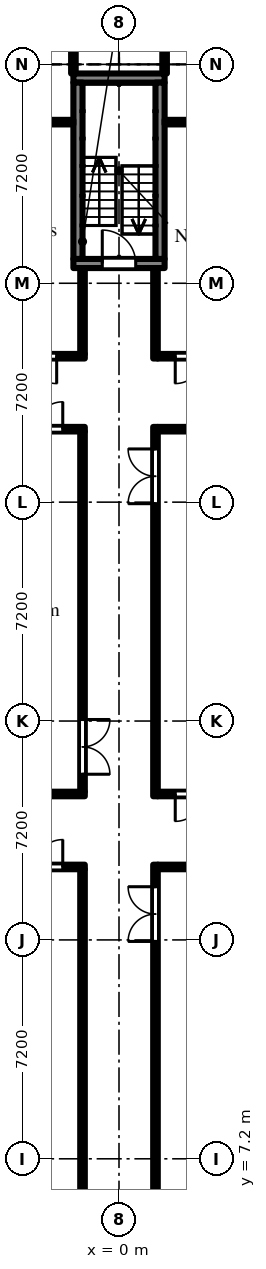
"""IFC4 building model, lengths in metres.
Left out: names, types, materials, properties, quantities, classifications, styles, units other than length and angle.
Written with IfcOpenShell. Run it as: python <this file> out.ifc"""

import sys

from ifc_helpers import new_model, si_unit, direction, frame, frame_2d, origin, place, context, subcontext, project, spatial, rectangle, extrude, element, fill, save


model = new_model("IFC4")
c1 = context("Model", 3, precision=1e-05, world=origin(), true_north=direction((0.0, 1.0)))
c2 = subcontext(c1, "Body", "Model", "MODEL_VIEW")
j1 = project(units=[si_unit("LENGTHUNIT", "METRE"), si_unit("PLANEANGLEUNIT", "RADIAN")], contexts=[c1])
p1 = place(None, origin())
s1 = spatial("IfcSite", under=j1, at=p1, CompositionType="ELEMENT")
p2 = place(p1, origin())
s2 = spatial("IfcBuilding", under=s1, at=p2, CompositionType="ELEMENT")
p3 = place(p2, frame((0.0, 0.0, -4.8)))
s3 = spatial("IfcBuildingStorey", under=s2, at=p3, CompositionType="ELEMENT", Elevation=-4.8)
p4 = place(p3, frame((-1.5, 36.65, 0.0), z_axis=(0.0, 0.0, 1.0), x_axis=(1.0, 0.0, 0.0)))
e1 = element("IfcWall", 1, at=p4, inside=s3, PredefinedType="SHEAR", context=c2, shape_type="SweptSolid", body=[
    extrude(rectangle(XDim=3.0, YDim=0.3, at=frame_2d((1.5, 0.0))), origin(), (0.0, 0.0, 1.0), 4.35),
])
p5 = place(p4, frame((0.95, 0.0, 0.0)))
e2 = element("IfcOpeningElement", 2, at=p5, cuts=e1, PredefinedType="OPENING", context=c2, shape_type="SweptSolid", body=[
    extrude(rectangle(XDim=1.1, YDim=2.1, at=frame_2d((0.55, 1.05))), frame((0.0, 0.16, 0.0), z_axis=(0.0, -1.0, 0.0), x_axis=(1.0, 0.0, 0.0)), (0.0, 0.0, 1.0), 0.32),
])
p6 = place(p3, frame((-1.5, 42.75, 0.0), z_axis=(0.0, 0.0, 1.0), x_axis=(1.0, 0.0, 0.0)))
e3 = element("IfcWall", 3, at=p6, inside=s3, PredefinedType="SHEAR", context=c2, shape_type="SweptSolid", body=[
    extrude(rectangle(XDim=3.0, YDim=0.3, at=frame_2d((1.5, 0.0))), origin(), (0.0, 0.0, 1.0), 4.35),
])
for number, where, z_axis, x_axis in (
    (4, (-1.35, 36.8, 0.0), (0.0, 0.0, 1.0), (0.0, 1.0, 0.0)),
    (5, (1.35, 36.8, 0.0), (0.0, 0.0, 1.0), (0.0, 1.0, 0.0)),
):
    element("IfcWall", number, at=place(p3, frame(where, z_axis=z_axis, x_axis=x_axis)), inside=s3, PredefinedType="SHEAR", context=c2, shape_type="SweptSolid", body=[
        extrude(rectangle(XDim=5.8, YDim=0.3, at=frame_2d((2.9, 0.0))), origin(), (0.0, 0.0, 1.0), 4.35),
    ])
p7 = place(p3, frame((-16.125, 16.8, 0.0), z_axis=(0.0, 0.0, 1.0), x_axis=(1.0, 0.0, 0.0)))
e6 = element("IfcWall", 6, at=p7, inside=s3, PredefinedType="PARTITIONING", context=c2, shape_type="SweptSolid", body=[
    extrude(rectangle(XDim=15.0, YDim=0.15, at=frame_2d((7.5, 0.0))), origin(), (0.0, 0.0, 1.0), 4.35),
])
p8 = place(p7, frame((12.475, 0.0, 0.0)))
e7 = element("IfcOpeningElement", 7, at=p8, cuts=e6, PredefinedType="OPENING", context=c2, shape_type="SweptSolid", body=[
    extrude(rectangle(XDim=1.8, YDim=2.1, at=frame_2d((0.9, 1.05))), frame((0.0, 0.085, 0.0), z_axis=(0.0, -1.0, 0.0), x_axis=(1.0, 0.0, 0.0)), (0.0, 0.0, 1.0), 0.17),
])
p9 = place(p3, frame((-16.125, 19.2, 0.0), z_axis=(0.0, 0.0, 1.0), x_axis=(1.0, 0.0, 0.0)))
e8 = element("IfcWall", 8, at=p9, inside=s3, PredefinedType="PARTITIONING", context=c2, shape_type="SweptSolid", body=[
    extrude(rectangle(XDim=15.0, YDim=0.15, at=frame_2d((7.5, 0.0))), origin(), (0.0, 0.0, 1.0), 4.35),
])
p10 = place(p9, frame((0.575, 0.0, 0.0)))
e9 = element("IfcOpeningElement", 9, at=p10, cuts=e8, PredefinedType="OPENING", context=c2, shape_type="SweptSolid", body=[
    extrude(rectangle(XDim=1.8, YDim=2.1, at=frame_2d((0.9, 1.05))), frame((0.0, 0.085, 0.0), z_axis=(0.0, -1.0, 0.0), x_axis=(1.0, 0.0, 0.0)), (0.0, 0.0, 1.0), 0.17),
])
p11 = place(p3, frame((-16.125, 31.2, 0.0), z_axis=(0.0, 0.0, 1.0), x_axis=(1.0, 0.0, 0.0)))
e10 = element("IfcWall", 10, at=p11, inside=s3, PredefinedType="PARTITIONING", context=c2, shape_type="SweptSolid", body=[
    extrude(rectangle(XDim=15.0, YDim=0.15, at=frame_2d((7.5, 0.0))), origin(), (0.0, 0.0, 1.0), 4.35),
])
p12 = place(p11, frame((12.475, 0.0, 0.0)))
e11 = element("IfcOpeningElement", 11, at=p12, cuts=e10, PredefinedType="OPENING", context=c2, shape_type="SweptSolid", body=[
    extrude(rectangle(XDim=1.8, YDim=2.1, at=frame_2d((0.9, 1.05))), frame((0.0, 0.085, 0.0), z_axis=(0.0, -1.0, 0.0), x_axis=(1.0, 0.0, 0.0)), (0.0, 0.0, 1.0), 0.17),
])
p13 = place(p3, frame((-16.125, 33.6, 0.0), z_axis=(0.0, 0.0, 1.0), x_axis=(1.0, 0.0, 0.0)))
e12 = element("IfcWall", 12, at=p13, inside=s3, PredefinedType="PARTITIONING", context=c2, shape_type="SweptSolid", body=[
    extrude(rectangle(XDim=15.0, YDim=0.15, at=frame_2d((7.5, 0.0))), origin(), (0.0, 0.0, 1.0), 4.35),
])
p14 = place(p13, frame((12.275, 0.0, 0.0)))
e13 = element("IfcOpeningElement", 13, at=p14, cuts=e12, PredefinedType="OPENING", context=c2, shape_type="SweptSolid", body=[
    extrude(rectangle(XDim=1.8, YDim=2.1, at=frame_2d((0.9, 1.05))), frame((0.0, 0.085, 0.0), z_axis=(0.0, -1.0, 0.0), x_axis=(1.0, 0.0, 0.0)), (0.0, 0.0, 1.0), 0.17),
])
p15 = place(p3, frame((-16.125, 41.3, 0.0), z_axis=(0.0, 0.0, 1.0), x_axis=(1.0, 0.0, 0.0)))
e14 = element("IfcWall", 14, at=p15, inside=s3, PredefinedType="PARTITIONING", context=c2, shape_type="SweptSolid", body=[
    extrude(rectangle(XDim=14.625, YDim=0.15, at=frame_2d((7.312, 0.0))), origin(), (0.0, 0.0, 1.0), 4.35),
])
p16 = place(p15, frame((10.725, 0.0, 0.0)))
e15 = element("IfcOpeningElement", 15, at=p16, cuts=e14, PredefinedType="OPENING", context=c2, shape_type="SweptSolid", body=[
    extrude(rectangle(XDim=1.8, YDim=2.1, at=frame_2d((0.9, 1.05))), frame((0.0, 0.085, 0.0), z_axis=(0.0, -1.0, 0.0), x_axis=(1.0, 0.0, 0.0)), (0.0, 0.0, 1.0), 0.17),
])
p17 = place(p3, frame((-1.5, 42.9, 0.0), z_axis=(0.0, 0.0, 1.0), x_axis=(0.0, 1.0, 0.0)))
e16 = element("IfcWall", 16, at=p17, inside=s3, PredefinedType="PARTITIONING", context=c2, shape_type="SweptSolid", body=[
    extrude(rectangle(XDim=0.825, YDim=0.15, at=frame_2d((0.413, 0.0))), origin(), (0.0, 0.0, 1.0), 4.35),
])
p18 = place(p3, frame((-1.2, 1.275, 0.0), z_axis=(0.0, 0.0, 1.0), x_axis=(0.0, 1.0, 0.0)))
e17 = element("IfcWall", 17, at=p18, inside=s3, PredefinedType="PARTITIONING", context=c2, shape_type="SweptSolid", body=[
    extrude(rectangle(XDim=15.45, YDim=0.15, at=frame_2d((7.725, 0.0))), origin(), (0.0, 0.0, 1.0), 4.35),
])
p19 = place(p3, frame((-1.2, 19.275, 0.0), z_axis=(0.0, 0.0, 1.0), x_axis=(0.0, 1.0, 0.0)))
e18 = element("IfcWall", 18, at=p19, inside=s3, PredefinedType="PARTITIONING", context=c2, shape_type="SweptSolid", body=[
    extrude(rectangle(XDim=11.85, YDim=0.15, at=frame_2d((5.925, 0.0))), origin(), (0.0, 0.0, 1.0), 4.35),
])
p20 = place(p19, frame((0.575, 0.0, 0.0)))
e19 = element("IfcOpeningElement", 19, at=p20, cuts=e18, PredefinedType="OPENING", context=c2, shape_type="SweptSolid", body=[
    extrude(rectangle(XDim=1.8, YDim=2.1, at=frame_2d((0.9, 1.05))), frame((0.0, 0.085, 0.0), z_axis=(0.0, -1.0, 0.0), x_axis=(1.0, 0.0, 0.0)), (0.0, 0.0, 1.0), 0.17),
])
p21 = place(p3, frame((-1.2, 33.675, 0.0), z_axis=(0.0, 0.0, 1.0), x_axis=(0.0, 1.0, 0.0)))
e20 = element("IfcWall", 20, at=p21, inside=s3, PredefinedType="PARTITIONING", context=c2, shape_type="SweptSolid", body=[
    extrude(rectangle(XDim=2.825, YDim=0.15, at=frame_2d((1.413, 0.0))), origin(), (0.0, 0.0, 1.0), 4.35),
])
p22 = place(p3, frame((1.2, 1.125, 0.0), z_axis=(0.0, 0.0, 1.0), x_axis=(0.0, 1.0, 0.0)))
e21 = element("IfcWall", 21, at=p22, inside=s3, PredefinedType="PARTITIONING", context=c2, shape_type="SweptSolid", body=[
    extrude(rectangle(XDim=15.75, YDim=0.15, at=frame_2d((7.875, 0.0))), origin(), (0.0, 0.0, 1.0), 4.35),
])
p23 = place(p22, frame((13.225, 0.0, 0.0)))
e22 = element("IfcOpeningElement", 22, at=p23, cuts=e21, PredefinedType="OPENING", context=c2, shape_type="SweptSolid", body=[
    extrude(rectangle(XDim=1.8, YDim=2.1, at=frame_2d((0.9, 1.05))), frame((0.0, 0.085, 0.0), z_axis=(0.0, -1.0, 0.0), x_axis=(1.0, 0.0, 0.0)), (0.0, 0.0, 1.0), 0.17),
])
p24 = place(p3, frame((1.275, 16.8, 0.0), z_axis=(0.0, 0.0, 1.0), x_axis=(1.0, 0.0, 0.0)))
e23 = element("IfcWall", 23, at=p24, inside=s3, PredefinedType="PARTITIONING", context=c2, shape_type="SweptSolid", body=[
    extrude(rectangle(XDim=15.0, YDim=0.15, at=frame_2d((7.5, 0.0))), origin(), (0.0, 0.0, 1.0), 4.35),
])
p25 = place(p24, frame((12.475, 0.0, 0.0)))
e24 = element("IfcOpeningElement", 24, at=p25, cuts=e23, PredefinedType="OPENING", context=c2, shape_type="SweptSolid", body=[
    extrude(rectangle(XDim=1.8, YDim=2.1, at=frame_2d((0.9, 1.05))), frame((0.0, 0.085, 0.0), z_axis=(0.0, -1.0, 0.0), x_axis=(1.0, 0.0, 0.0)), (0.0, 0.0, 1.0), 0.17),
])
p26 = place(p3, frame((1.2, 19.125, 0.0), z_axis=(0.0, 0.0, 1.0), x_axis=(0.0, 1.0, 0.0)))
e25 = element("IfcWall", 25, at=p26, inside=s3, PredefinedType="PARTITIONING", context=c2, shape_type="SweptSolid", body=[
    extrude(rectangle(XDim=12.15, YDim=0.15, at=frame_2d((6.075, 0.0))), origin(), (0.0, 0.0, 1.0), 4.35),
])
p27 = place(p26, frame((9.625, 0.0, 0.0)))
e26 = element("IfcOpeningElement", 26, at=p27, cuts=e25, PredefinedType="OPENING", context=c2, shape_type="SweptSolid", body=[
    extrude(rectangle(XDim=1.8, YDim=2.1, at=frame_2d((0.9, 1.05))), frame((0.0, 0.085, 0.0), z_axis=(0.0, -1.0, 0.0), x_axis=(1.0, 0.0, 0.0)), (0.0, 0.0, 1.0), 0.17),
])
p28 = place(p3, frame((1.275, 19.2, 0.0), z_axis=(0.0, 0.0, 1.0), x_axis=(1.0, 0.0, 0.0)))
e27 = element("IfcWall", 27, at=p28, inside=s3, PredefinedType="PARTITIONING", context=c2, shape_type="SweptSolid", body=[
    extrude(rectangle(XDim=15.0, YDim=0.15, at=frame_2d((7.5, 0.0))), origin(), (0.0, 0.0, 1.0), 4.35),
])
p29 = place(p28, frame((0.575, 0.0, 0.0)))
e28 = element("IfcOpeningElement", 28, at=p29, cuts=e27, PredefinedType="OPENING", context=c2, shape_type="SweptSolid", body=[
    extrude(rectangle(XDim=1.8, YDim=2.1, at=frame_2d((0.9, 1.05))), frame((0.0, 0.085, 0.0), z_axis=(0.0, -1.0, 0.0), x_axis=(1.0, 0.0, 0.0)), (0.0, 0.0, 1.0), 0.17),
])
p30 = place(p3, frame((1.275, 31.2, 0.0), z_axis=(0.0, 0.0, 1.0), x_axis=(1.0, 0.0, 0.0)))
e29 = element("IfcWall", 29, at=p30, inside=s3, PredefinedType="PARTITIONING", context=c2, shape_type="SweptSolid", body=[
    extrude(rectangle(XDim=15.0, YDim=0.15, at=frame_2d((7.5, 0.0))), origin(), (0.0, 0.0, 1.0), 4.35),
])
p31 = place(p30, frame((12.475, 0.0, 0.0)))
e30 = element("IfcOpeningElement", 30, at=p31, cuts=e29, PredefinedType="OPENING", context=c2, shape_type="SweptSolid", body=[
    extrude(rectangle(XDim=1.8, YDim=2.1, at=frame_2d((0.9, 1.05))), frame((0.0, 0.085, 0.0), z_axis=(0.0, -1.0, 0.0), x_axis=(1.0, 0.0, 0.0)), (0.0, 0.0, 1.0), 0.17),
])
p32 = place(p3, frame((1.2, 33.525, 0.0), z_axis=(0.0, 0.0, 1.0), x_axis=(0.0, 1.0, 0.0)))
e31 = element("IfcWall", 31, at=p32, inside=s3, PredefinedType="PARTITIONING", context=c2, shape_type="SweptSolid", body=[
    extrude(rectangle(XDim=2.975, YDim=0.15, at=frame_2d((1.488, 0.0))), origin(), (0.0, 0.0, 1.0), 4.35),
])
p33 = place(p3, frame((1.275, 33.6, 0.0), z_axis=(0.0, 0.0, 1.0), x_axis=(1.0, 0.0, 0.0)))
e32 = element("IfcWall", 32, at=p33, inside=s3, PredefinedType="PARTITIONING", context=c2, shape_type="SweptSolid", body=[
    extrude(rectangle(XDim=15.0, YDim=0.15, at=frame_2d((7.5, 0.0))), origin(), (0.0, 0.0, 1.0), 4.35),
])
p34 = place(p33, frame((0.575, 0.0, 0.0)))
e33 = element("IfcOpeningElement", 33, at=p34, cuts=e32, PredefinedType="OPENING", context=c2, shape_type="SweptSolid", body=[
    extrude(rectangle(XDim=1.8, YDim=2.1, at=frame_2d((0.9, 1.05))), frame((0.0, 0.085, 0.0), z_axis=(0.0, -1.0, 0.0), x_axis=(1.0, 0.0, 0.0)), (0.0, 0.0, 1.0), 0.17),
])
p35 = place(p3, frame((1.5, 41.3, 0.0), z_axis=(0.0, 0.0, 1.0), x_axis=(1.0, 0.0, 0.0)))
e34 = element("IfcWall", 34, at=p35, inside=s3, PredefinedType="PARTITIONING", context=c2, shape_type="SweptSolid", body=[
    extrude(rectangle(XDim=14.775, YDim=0.15, at=frame_2d((7.387, 0.0))), origin(), (0.0, 0.0, 1.0), 4.35),
])
p36 = place(p35, frame((2.1, 0.0, 0.0)))
e35 = element("IfcOpeningElement", 35, at=p36, cuts=e34, PredefinedType="OPENING", context=c2, shape_type="SweptSolid", body=[
    extrude(rectangle(XDim=1.8, YDim=2.1, at=frame_2d((0.9, 1.05))), frame((0.0, 0.085, 0.0), z_axis=(0.0, -1.0, 0.0), x_axis=(1.0, 0.0, 0.0)), (0.0, 0.0, 1.0), 0.17),
])
p37 = place(p3, frame((1.5, 42.9, 0.0), z_axis=(0.0, 0.0, 1.0), x_axis=(0.0, 1.0, 0.0)))
e36 = element("IfcWall", 36, at=p37, inside=s3, PredefinedType="PARTITIONING", context=c2, shape_type="SweptSolid", body=[
    extrude(rectangle(XDim=0.975, YDim=0.15, at=frame_2d((0.488, 0.0))), origin(), (0.0, 0.0, 1.0), 4.35),
])
p38 = place(p5, origin())
e37 = element("IfcDoor", 37, at=p38, inside=s3, OperationType="SINGLE_SWING_LEFT", PredefinedType="DOOR", context=c2, shape_type="SweptSolid", body=[
    extrude(rectangle(XDim=1.1, YDim=2.1, at=frame_2d((0.55, 1.05))), frame((0.0, 0.025, 0.0), z_axis=(0.0, -1.0, 0.0), x_axis=(1.0, 0.0, 0.0)), (0.0, 0.0, 1.0), 0.05),
])
fill(e2, e37)
p39 = place(p23, origin())
e38 = element("IfcDoor", 38, at=p39, inside=s3, OperationType="DOUBLE_DOOR_DOUBLE_SWING", PredefinedType="DOOR", context=c2, shape_type="SweptSolid", body=[
    extrude(rectangle(XDim=1.8, YDim=2.1, at=frame_2d((0.9, 1.05))), frame((0.0, 0.025, 0.0), z_axis=(0.0, -1.0, 0.0), x_axis=(1.0, 0.0, 0.0)), (0.0, 0.0, 1.0), 0.05),
])
fill(e22, e38)
p40 = place(p27, origin())
e39 = element("IfcDoor", 39, at=p40, inside=s3, OperationType="DOUBLE_DOOR_DOUBLE_SWING", PredefinedType="DOOR", context=c2, shape_type="SweptSolid", body=[
    extrude(rectangle(XDim=1.8, YDim=2.1, at=frame_2d((0.9, 1.05))), frame((0.0, 0.025, 0.0), z_axis=(0.0, -1.0, 0.0), x_axis=(1.0, 0.0, 0.0)), (0.0, 0.0, 1.0), 0.05),
])
fill(e26, e39)
p41 = place(p29, frame((1.8, 0.0, 0.0), z_axis=(0.0, 0.0, 1.0), x_axis=(-1.0, 0.0, 0.0)))
e40 = element("IfcDoor", 40, at=p41, inside=s3, OperationType="DOUBLE_DOOR_DOUBLE_SWING", PredefinedType="DOOR", context=c2, shape_type="SweptSolid", body=[
    extrude(rectangle(XDim=1.8, YDim=2.1, at=frame_2d((0.9, 1.05))), frame((0.0, 0.025, 0.0), z_axis=(0.0, -1.0, 0.0), x_axis=(1.0, 0.0, 0.0)), (0.0, 0.0, 1.0), 0.05),
])
fill(e28, e40)
p42 = place(p8, origin())
e41 = element("IfcDoor", 41, at=p42, inside=s3, OperationType="DOUBLE_DOOR_DOUBLE_SWING", PredefinedType="DOOR", context=c2, shape_type="SweptSolid", body=[
    extrude(rectangle(XDim=1.8, YDim=2.1, at=frame_2d((0.9, 1.05))), frame((0.0, 0.025, 0.0), z_axis=(0.0, -1.0, 0.0), x_axis=(1.0, 0.0, 0.0)), (0.0, 0.0, 1.0), 0.05),
])
fill(e7, e41)
p43 = place(p12, origin())
e42 = element("IfcDoor", 42, at=p43, inside=s3, OperationType="DOUBLE_DOOR_DOUBLE_SWING", PredefinedType="DOOR", context=c2, shape_type="SweptSolid", body=[
    extrude(rectangle(XDim=1.8, YDim=2.1, at=frame_2d((0.9, 1.05))), frame((0.0, 0.025, 0.0), z_axis=(0.0, -1.0, 0.0), x_axis=(1.0, 0.0, 0.0)), (0.0, 0.0, 1.0), 0.05),
])
fill(e11, e42)
p44 = place(p20, frame((1.8, 0.0, 0.0), z_axis=(0.0, 0.0, 1.0), x_axis=(-1.0, 0.0, 0.0)))
e43 = element("IfcDoor", 43, at=p44, inside=s3, OperationType="DOUBLE_DOOR_DOUBLE_SWING", PredefinedType="DOOR", context=c2, shape_type="SweptSolid", body=[
    extrude(rectangle(XDim=1.8, YDim=2.1, at=frame_2d((0.9, 1.05))), frame((0.0, 0.025, 0.0), z_axis=(0.0, -1.0, 0.0), x_axis=(1.0, 0.0, 0.0)), (0.0, 0.0, 1.0), 0.05),
])
fill(e19, e43)
p45 = place(p14, frame((1.8, 0.0, 0.0), z_axis=(0.0, 0.0, 1.0), x_axis=(-1.0, 0.0, 0.0)))
e44 = element("IfcDoor", 44, at=p45, inside=s3, OperationType="DOUBLE_DOOR_DOUBLE_SWING", PredefinedType="DOOR", context=c2, shape_type="SweptSolid", body=[
    extrude(rectangle(XDim=1.8, YDim=2.1, at=frame_2d((0.9, 1.05))), frame((0.0, 0.025, 0.0), z_axis=(0.0, -1.0, 0.0), x_axis=(1.0, 0.0, 0.0)), (0.0, 0.0, 1.0), 0.05),
])
fill(e13, e44)
p46 = place(p34, frame((1.8, 0.0, 0.0), z_axis=(0.0, 0.0, 1.0), x_axis=(-1.0, 0.0, 0.0)))
e45 = element("IfcDoor", 45, at=p46, inside=s3, OperationType="DOUBLE_DOOR_DOUBLE_SWING", PredefinedType="DOOR", context=c2, shape_type="SweptSolid", body=[
    extrude(rectangle(XDim=1.8, YDim=2.1, at=frame_2d((0.9, 1.05))), frame((0.0, 0.025, 0.0), z_axis=(0.0, -1.0, 0.0), x_axis=(1.0, 0.0, 0.0)), (0.0, 0.0, 1.0), 0.05),
])
fill(e33, e45)
save(model, sys.argv[1])
